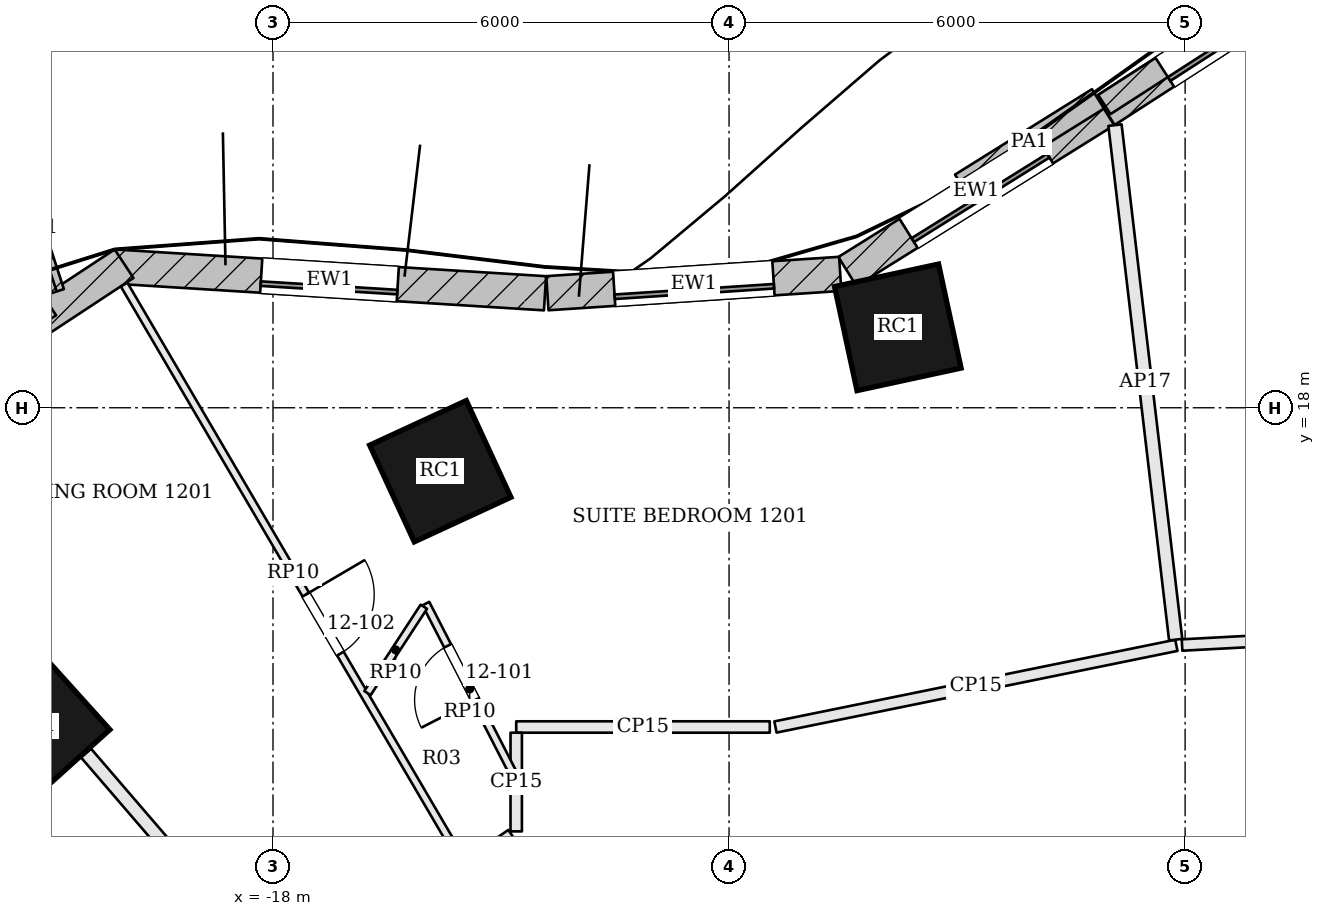
"""IFC4 building model, lengths in metres.
Left out: names, types, materials, properties, quantities, classifications, styles, units other than length and angle.
Written with IfcOpenShell. Run it as: python <this file> out.ifc"""

import sys

from ifc_helpers import new_model, si_unit, direction, frame, frame_2d, origin, origin_2d, place, context, subcontext, project, spatial, rectangle, extrude, element, fill, save


model = new_model("IFC4")
c1 = context("Model", 3, precision=1e-05, world=origin(), true_north=direction((0.0, 1.0)))
c2 = subcontext(c1, "Body", "Model", "MODEL_VIEW")
j1 = project(units=[si_unit("LENGTHUNIT", "METRE"), si_unit("PLANEANGLEUNIT", "RADIAN")], contexts=[c1])
p1 = place(None, origin())
s1 = spatial("IfcSite", under=j1, at=p1, CompositionType="ELEMENT")
p2 = place(p1, origin())
s2 = spatial("IfcBuilding", under=s1, at=p2, CompositionType="ELEMENT")
p3 = place(p2, frame((0.0, 0.0, 59.1)))
s3 = spatial("IfcBuildingStorey", under=s2, at=p3, CompositionType="ELEMENT", Elevation=59.1)
for number, where, z_axis, x_axis in (
    (1, (-9.78, 19.058, 0.0), (0.0, 0.0, 1.0), (-0.977, -0.211, 0.0)),
    (2, (-15.799, 17.165, 0.0), (0.0, 0.0, 1.0), (-0.908, -0.419, 0.0)),
    (3, (-21.135, 13.817, 0.0), (0.0, 0.0, 1.0), (-0.743, -0.67, 0.0)),
):
    element("IfcColumn", number, at=place(p3, frame(where, z_axis=z_axis, x_axis=x_axis)), inside=s3, PredefinedType="COLUMN", context=c2, shape_type="SweptSolid", body=[
        extrude(rectangle(XDim=1.4, YDim=1.4, at=origin_2d()), origin(), (0.0, 0.0, 1.0), 3.6),
    ])
p4 = place(p3, frame((-3.721, 24.055, 0.0), z_axis=(0.0, 0.0, 1.0), x_axis=(-0.840404438766, -0.54195975801, 0.0)))
e4 = element("IfcWall", 4, at=p4, inside=s3, PredefinedType="SOLIDWALL", context=c2, shape_type="SweptSolid", body=[
    extrude(rectangle(XDim=3.96, YDim=0.45, at=frame_2d((1.98, 0.0))), origin(), (0.0, 0.0, 1.0), 3.4),
])
p5 = place(p4, frame((0.93, 0.0, 0.9)))
e5 = element("IfcOpeningElement", 5, at=p5, cuts=e4, PredefinedType="OPENING", context=c2, shape_type="SweptSolid", body=[
    extrude(rectangle(XDim=2.1, YDim=2.0, at=frame_2d((1.05, 1.0))), frame((0.0, 0.235, 0.0), z_axis=(0.0, -1.0, 0.0), x_axis=(1.0, 0.0, 0.0)), (0.0, 0.0, 1.0), 0.47),
])
p6 = place(p3, frame((-7.052, 21.907, 0.0), z_axis=(0.0, 0.0, 1.0), x_axis=(-0.848498976054, -0.529197021566, 0.0)))
e6 = element("IfcWall", 6, at=p6, inside=s3, PredefinedType="SOLIDWALL", context=c2, shape_type="SweptSolid", body=[
    extrude(rectangle(XDim=3.997, YDim=0.45, at=frame_2d((1.998, 0.0))), origin(), (0.0, 0.0, 1.0), 3.4),
])
p7 = place(p6, frame((0.948, 0.0, 0.9)))
e7 = element("IfcOpeningElement", 7, at=p7, cuts=e6, PredefinedType="OPENING", context=c2, shape_type="SweptSolid", body=[
    extrude(rectangle(XDim=2.1, YDim=2.0, at=frame_2d((1.05, 1.0))), frame((0.0, 0.235, 0.0), z_axis=(0.0, -1.0, 0.0), x_axis=(1.0, 0.0, 0.0)), (0.0, 0.0, 1.0), 0.47),
])
p8 = place(p3, frame((-10.537, 19.761, 0.0), z_axis=(0.0, 0.0, 1.0), x_axis=(-0.997831357874, -0.065822346084, 0.0)))
e8 = element("IfcWall", 8, at=p8, inside=s3, PredefinedType="SOLIDWALL", context=c2, shape_type="SweptSolid", body=[
    extrude(rectangle(XDim=3.861, YDim=0.45, at=frame_2d((1.931, 0.0))), origin(), (0.0, 0.0, 1.0), 3.4),
])
p9 = place(p8, frame((0.881, 0.0, 0.9)))
e9 = element("IfcOpeningElement", 9, at=p9, cuts=e8, PredefinedType="OPENING", context=c2, shape_type="SweptSolid", body=[
    extrude(rectangle(XDim=2.1, YDim=2.0, at=frame_2d((1.05, 1.0))), frame((0.0, 0.235, 0.0), z_axis=(0.0, -1.0, 0.0), x_axis=(1.0, 0.0, 0.0)), (0.0, 0.0, 1.0), 0.47),
])
p10 = place(p3, frame((-14.421, 19.506, 0.0), z_axis=(0.0, 0.0, 1.0), x_axis=(-0.998078573447, 0.06196096534, 0.0)))
e10 = element("IfcWall", 10, at=p10, inside=s3, PredefinedType="SOLIDWALL", context=c2, shape_type="SweptSolid", body=[
    extrude(rectangle(XDim=5.682, YDim=0.45, at=frame_2d((2.841, 0.0))), origin(), (0.0, 0.0, 1.0), 3.4),
])
p11 = place(p10, frame((1.941, 0.0, 0.9)))
e11 = element("IfcOpeningElement", 11, at=p11, cuts=e10, PredefinedType="OPENING", context=c2, shape_type="SweptSolid", body=[
    extrude(rectangle(XDim=1.8, YDim=2.0, at=frame_2d((0.9, 1.0))), frame((0.0, 0.235, 0.0), z_axis=(0.0, -1.0, 0.0), x_axis=(1.0, 0.0, 0.0)), (0.0, 0.0, 1.0), 0.47),
])
p12 = place(p3, frame((-19.959, 19.895, 0.0), z_axis=(0.0, 0.0, 1.0), x_axis=(-0.835201398752, -0.549944200372, 0.0)))
e12 = element("IfcWall", 12, at=p12, inside=s3, PredefinedType="SOLIDWALL", context=c2, shape_type="SweptSolid", body=[
    extrude(rectangle(XDim=4.748, YDim=0.45, at=frame_2d((2.374, 0.0))), origin(), (0.0, 0.0, 1.0), 3.4),
])
p13 = place(p12, frame((1.324, 0.0, 0.9)))
e13 = element("IfcOpeningElement", 13, at=p13, cuts=e12, PredefinedType="OPENING", context=c2, shape_type="SweptSolid", body=[
    extrude(rectangle(XDim=2.1, YDim=2.0, at=frame_2d((1.05, 1.0))), frame((0.0, 0.235, 0.0), z_axis=(0.0, -1.0, 0.0), x_axis=(1.0, 0.0, 0.0)), (0.0, 0.0, 1.0), 0.47),
])
p14 = place(p3, frame((-20.846, 19.53, 0.0), z_axis=(0.0, 0.0, 1.0), x_axis=(-0.309732726603, 0.950823662974, 0.0)))
e14 = element("IfcWall", 14, at=p14, inside=s3, PredefinedType="SOLIDWALL", context=c2, shape_type="SweptSolid", body=[
    extrude(rectangle(XDim=1.75, YDim=0.2, at=frame_2d((0.875, 0.0))), origin(), (0.0, 0.0, 1.0), 3.4),
])
p15 = place(p3, frame((-3.839, 24.068, 3.6), z_axis=(0.0, 0.0, 1.0), x_axis=(-0.84044157539, -0.541902166776, 0.0)))
e15 = element("IfcWall", 15, at=p15, inside=s3, PredefinedType="PARAPET", context=c2, shape_type="SweptSolid", body=[
    extrude(rectangle(XDim=3.836, YDim=0.3, at=frame_2d((1.918, 0.0))), origin(), (0.0, 0.0, 1.0), 1.1),
])
p16 = place(p3, frame((-7.146, 22.064, 3.6), z_axis=(0.0, 0.0, 1.0), x_axis=(-0.848488829337, -0.529213290168, 0.0)))
e16 = element("IfcWall", 16, at=p16, inside=s3, PredefinedType="PARAPET", context=c2, shape_type="SweptSolid", body=[
    extrude(rectangle(XDim=2.124, YDim=0.3, at=frame_2d((1.062, 0.0))), origin(), (0.0, 0.0, 1.0), 1.1),
])
p17 = place(p3, frame((-20.936, 19.342, 3.6), z_axis=(0.0, 0.0, 1.0), x_axis=(-0.835169297141, -0.549992950057, 0.0)))
e17 = element("IfcWall", 17, at=p17, inside=s3, PredefinedType="PARAPET", context=c2, shape_type="SweptSolid", body=[
    extrude(rectangle(XDim=3.49, YDim=0.3, at=frame_2d((1.745, 0.0))), origin(), (0.0, 0.0, 1.0), 1.1),
])
p18 = place(p3, frame((-6.115, 14.875, 0.0), z_axis=(0.0, 0.0, 1.0), x_axis=(-0.979873098531, -0.199621418629, 0.0)))
e18 = element("IfcWall", 18, at=p18, inside=s3, PredefinedType="PARTITIONING", context=c2, shape_type="SweptSolid", body=[
    extrude(rectangle(XDim=5.383, YDim=0.15, at=frame_2d((2.691, 0.0))), origin(), (0.0, 0.0, 1.0), 2.68),
])
p19 = place(p3, frame((-11.464, 13.8, 0.0), z_axis=(0.0, 0.0, 1.0), x_axis=(-1.0, 0.0, 0.0)))
e19 = element("IfcWall", 19, at=p19, inside=s3, PredefinedType="PARTITIONING", context=c2, shape_type="SweptSolid", body=[
    extrude(rectangle(XDim=3.336, YDim=0.15, at=frame_2d((1.668, 0.0))), origin(), (0.0, 0.0, 1.0), 2.68),
])
p20 = place(p3, frame((-14.8, 13.725, 0.0), z_axis=(0.0, 0.0, 1.0), x_axis=(-0.000188040613, -0.99999998232, 0.0)))
e20 = element("IfcWall", 20, at=p20, inside=s3, PredefinedType="PARTITIONING", context=c2, shape_type="SweptSolid", body=[
    extrude(rectangle(XDim=1.298, YDim=0.15, at=frame_2d((0.649, 0.0))), origin(), (0.0, 0.0, 1.0), 2.68),
])
p21 = place(p3, frame((-14.862, 12.384, 0.0), z_axis=(0.0, 0.0, 1.0), x_axis=(-0.821152323197, -0.570709087108, 0.0)))
e21 = element("IfcWall", 21, at=p21, inside=s3, PredefinedType="PARTITIONING", context=c2, shape_type="SweptSolid", body=[
    extrude(rectangle(XDim=3.563, YDim=0.15, at=frame_2d((1.781, 0.0))), origin(), (0.0, 0.0, 1.0), 2.68),
])
p22 = place(p21, frame((1.652, 0.0, 0.0)))
e22 = element("IfcOpeningElement", 22, at=p22, cuts=e21, PredefinedType="OPENING", context=c2, shape_type="SweptSolid", body=[
    extrude(rectangle(XDim=1.0, YDim=2.1, at=frame_2d((0.5, 1.05))), frame((0.0, 0.085, 0.0), z_axis=(0.0, -1.0, 0.0), x_axis=(1.0, 0.0, 0.0)), (0.0, 0.0, 1.0), 0.17),
])
p23 = place(p3, frame((-6.923, 21.718, 0.0), z_axis=(0.0, 0.0, 1.0), x_axis=(0.117163366321, -0.993112655036, 0.0)))
e23 = element("IfcWall", 23, at=p23, inside=s3, PredefinedType="PARTITIONING", context=c2, shape_type="SweptSolid", body=[
    extrude(rectangle(XDim=6.816, YDim=0.175, at=frame_2d((3.408, 0.0))), origin(), (0.0, 0.0, 1.0), 2.68),
])
p24 = place(p3, frame((-20.459, 13.457, 0.0), z_axis=(0.0, 0.0, 1.0), x_axis=(0.652095095558, -0.758137181748, 0.0)))
e24 = element("IfcWall", 24, at=p24, inside=s3, PredefinedType="PARTITIONING", context=c2, shape_type="SweptSolid", body=[
    extrude(rectangle(XDim=4.022, YDim=0.175, at=frame_2d((2.011, 0.0))), origin(), (0.0, 0.0, 1.0), 2.68),
])
p25 = place(p3, frame((-0.075, 15.196, 0.0), z_axis=(0.0, 0.0, 1.0), x_axis=(-0.998589803119, -0.05308865328, 0.0)))
e25 = element("IfcWall", 25, at=p25, inside=s3, PredefinedType="PARTITIONING", context=c2, shape_type="SweptSolid", body=[
    extrude(rectangle(XDim=5.974, YDim=0.15, at=frame_2d((2.987, 0.0))), origin(), (0.0, 0.0, 1.0), 2.68),
])
p26 = place(p25, frame((2.514, 0.0, 0.0)))
e26 = element("IfcOpeningElement", 26, at=p26, cuts=e25, PredefinedType="OPENING", context=c2, shape_type="SweptSolid", body=[
    extrude(rectangle(XDim=1.0, YDim=2.1, at=frame_2d((0.5, 1.05))), frame((0.0, 0.085, 0.0), z_axis=(0.0, -1.0, 0.0), x_axis=(1.0, 0.0, 0.0)), (0.0, 0.0, 1.0), 0.17),
])
p27 = place(p3, frame((-19.958, 19.62, 0.0), z_axis=(0.0, 0.0, 1.0), x_axis=(0.505625538269, -0.862753044069, 0.0)))
e27 = element("IfcWall", 27, at=p27, inside=s3, PredefinedType="PARTITIONING", context=c2, shape_type="SweptSolid", body=[
    extrude(rectangle(XDim=8.802, YDim=0.1, at=frame_2d((4.401, 0.0))), origin(), (0.0, 0.0, 1.0), 2.898),
])
p28 = place(p27, frame((4.727, 0.0, 0.0)))
e28 = element("IfcOpeningElement", 28, at=p28, cuts=e27, PredefinedType="OPENING", context=c2, shape_type="SweptSolid", body=[
    extrude(rectangle(XDim=0.9, YDim=2.4, at=frame_2d((0.45, 1.2))), frame((0.0, 0.06, 0.0), z_axis=(0.0, -1.0, 0.0), x_axis=(1.0, 0.0, 0.0)), (0.0, 0.0, 1.0), 0.12),
])
p29 = place(p3, frame((-14.834, 13.178, 0.0), z_axis=(0.0, 0.0, 1.0), x_axis=(-0.457048681662, 0.889441680264, 0.0)))
e29 = element("IfcWall", 29, at=p29, inside=s3, PredefinedType="PARTITIONING", context=c2, shape_type="SweptSolid", body=[
    extrude(rectangle(XDim=2.525, YDim=0.1, at=frame_2d((1.262, 0.0))), origin(), (0.0, 0.0, 1.0), 2.898),
])
p30 = place(p29, frame((1.1, 0.0, 0.0)))
e30 = element("IfcOpeningElement", 30, at=p30, cuts=e29, PredefinedType="OPENING", context=c2, shape_type="SweptSolid", body=[
    extrude(rectangle(XDim=0.8, YDim=2.1, at=frame_2d((0.4, 1.05))), frame((0.0, 0.06, 0.0), z_axis=(0.0, -1.0, 0.0), x_axis=(1.0, 0.0, 0.0)), (0.0, 0.0, 1.0), 0.12),
])
p31 = place(p3, frame((-16.016, 15.382, 0.0), z_axis=(0.0, 0.0, 1.0), x_axis=(-0.546613733712, -0.837384873351, 0.0)))
e31 = element("IfcWall", 31, at=p31, inside=s3, PredefinedType="PARTITIONING", context=c2, shape_type="SweptSolid", body=[
    extrude(rectangle(XDim=1.356, YDim=0.1, at=frame_2d((0.678, 0.0))), origin(), (0.0, 0.0, 1.0), 2.898),
])
p32 = place(p3, frame((-24.996, 12.871, 0.0), z_axis=(0.0, 0.0, 1.0), x_axis=(0.779371961482, -0.626561525835, 0.0)))
e32 = element("IfcWall", 32, at=p32, inside=s3, PredefinedType="PARTITIONING", context=c2, shape_type="SweptSolid", body=[
    extrude(rectangle(XDim=6.932, YDim=0.1, at=frame_2d((3.466, 0.0))), origin(), (0.0, 0.0, 1.0), 2.898),
])
p33 = place(p32, frame((2.857, 0.0, 0.0)))
e33 = element("IfcOpeningElement", 33, at=p33, cuts=e32, PredefinedType="OPENING", context=c2, shape_type="SweptSolid", body=[
    extrude(rectangle(XDim=0.9, YDim=2.4, at=frame_2d((0.45, 1.2))), frame((0.0, 0.06, 0.0), z_axis=(0.0, -1.0, 0.0), x_axis=(1.0, 0.0, 0.0)), (0.0, 0.0, 1.0), 0.12),
])
p34 = place(p5, origin())
e34 = element("IfcWindow", 34, at=p34, inside=s3, PartitioningType="SINGLE_PANEL", PredefinedType="WINDOW", context=c2, shape_type="SweptSolid", body=[
    extrude(rectangle(XDim=2.1, YDim=2.0, at=frame_2d((1.05, 1.0))), frame((0.0, 0.135, 0.0), z_axis=(0.0, -1.0, 0.0), x_axis=(1.0, 0.0, 0.0)), (0.0, 0.0, 1.0), 0.06),
])
fill(e5, e34)
p35 = place(p7, origin())
e35 = element("IfcWindow", 35, at=p35, inside=s3, PartitioningType="SINGLE_PANEL", PredefinedType="WINDOW", context=c2, shape_type="SweptSolid", body=[
    extrude(rectangle(XDim=2.1, YDim=2.0, at=frame_2d((1.05, 1.0))), frame((0.0, 0.135, 0.0), z_axis=(0.0, -1.0, 0.0), x_axis=(1.0, 0.0, 0.0)), (0.0, 0.0, 1.0), 0.06),
])
fill(e7, e35)
p36 = place(p9, origin())
e36 = element("IfcWindow", 36, at=p36, inside=s3, PartitioningType="SINGLE_PANEL", PredefinedType="WINDOW", context=c2, shape_type="SweptSolid", body=[
    extrude(rectangle(XDim=2.1, YDim=2.0, at=frame_2d((1.05, 1.0))), frame((0.0, 0.135, 0.0), z_axis=(0.0, -1.0, 0.0), x_axis=(1.0, 0.0, 0.0)), (0.0, 0.0, 1.0), 0.06),
])
fill(e9, e36)
p37 = place(p11, origin())
e37 = element("IfcWindow", 37, at=p37, inside=s3, PartitioningType="SINGLE_PANEL", PredefinedType="WINDOW", context=c2, shape_type="SweptSolid", body=[
    extrude(rectangle(XDim=1.8, YDim=2.0, at=frame_2d((0.9, 1.0))), frame((0.0, 0.135, 0.0), z_axis=(0.0, -1.0, 0.0), x_axis=(1.0, 0.0, 0.0)), (0.0, 0.0, 1.0), 0.06),
])
fill(e11, e37)
p38 = place(p30, origin())
e38 = element("IfcDoor", 38, at=p38, inside=s3, OperationType="SINGLE_SWING_LEFT", PredefinedType="DOOR", context=c2, shape_type="SweptSolid", body=[
    extrude(rectangle(XDim=0.8, YDim=2.1, at=frame_2d((0.4, 1.05))), frame((0.0, 0.025, 0.0), z_axis=(0.0, -1.0, 0.0), x_axis=(1.0, 0.0, 0.0)), (0.0, 0.0, 1.0), 0.05),
])
fill(e30, e38)
p39 = place(p28, origin())
e39 = element("IfcDoor", 39, at=p39, inside=s3, OperationType="SINGLE_SWING_LEFT", PredefinedType="DOOR", context=c2, shape_type="SweptSolid", body=[
    extrude(rectangle(XDim=0.9, YDim=2.4, at=frame_2d((0.45, 1.2))), frame((0.0, 0.025, 0.0), z_axis=(0.0, -1.0, 0.0), x_axis=(1.0, 0.0, 0.0)), (0.0, 0.0, 1.0), 0.05),
])
fill(e28, e39)
save(model, sys.argv[1])
